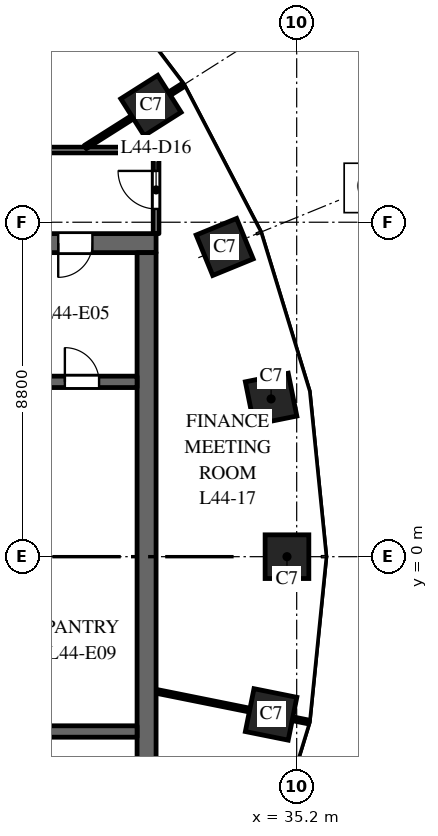
"""IFC4 building model, lengths in metres.
Left out: names, types, materials, properties, quantities, classifications, styles, units other than length and angle.
Written with IfcOpenShell. Run it as: python <this file> out.ifc"""

import sys

from ifc_helpers import new_model, si_unit, direction, frame, frame_2d, origin, origin_2d, place, context, subcontext, project, spatial, rectangle, extrude, element, fill, save


model = new_model("IFC4")
c1 = context("Model", 3, precision=1e-05, world=origin(), true_north=direction((0.0, 1.0)))
c2 = subcontext(c1, "Body", "Model", "MODEL_VIEW")
j1 = project(units=[si_unit("LENGTHUNIT", "METRE"), si_unit("PLANEANGLEUNIT", "RADIAN")], contexts=[c1])
p1 = place(None, origin())
s1 = spatial("IfcSite", under=j1, at=p1, CompositionType="ELEMENT")
p2 = place(p1, origin())
s2 = spatial("IfcBuilding", under=s1, at=p2, CompositionType="ELEMENT")
p3 = place(p2, frame((0.0, 0.0, 190.0)))
s3 = spatial("IfcBuildingStorey", under=s2, at=p3, CompositionType="ELEMENT", Elevation=190.0)
for number, where, z_axis, x_axis in (
    (1, (34.945, 0.0, 0.0), (0.0, 0.0, 1.0), (0.0, 1.0, 0.0)),
    (2, (34.527, 4.151, 0.0), (0.0, 0.0, 1.0), (-0.197, 0.98, 0.0)),
    (3, (33.305, 8.149, 0.0), (0.0, 0.0, 1.0), (-0.379, 0.925, 0.0)),
    (4, (31.365, 11.871, 0.0), (0.0, 0.0, 1.0), (-0.535, 0.845, 0.0)),
    (5, (34.527, -4.151, 0.0), (0.0, 0.0, 1.0), (0.197, 0.98, 0.0)),
):
    element("IfcColumn", number, at=place(p3, frame(where, z_axis=z_axis, x_axis=x_axis)), inside=s3, PredefinedType="COLUMN", context=c2, shape_type="SweptSolid", body=[
        extrude(rectangle(XDim=1.15, YDim=1.15, at=origin_2d()), origin(), (0.0, 0.0, 1.0), 4.0),
    ])
p4 = place(p3, frame((16.5, 8.25, 0.0), z_axis=(0.0, 0.0, 1.0), x_axis=(1.0, 0.0, 0.0)))
e6 = element("IfcWall", 6, at=p4, inside=s3, PredefinedType="SHEAR", context=c2, shape_type="SweptSolid", body=[
    extrude(rectangle(XDim=15.0, YDim=0.5, at=frame_2d((7.5, 0.0))), origin(), (0.0, 0.0, 1.0), 3.7),
])
p5 = place(p4, frame((6.9, 0.0, 0.0)))
e7 = element("IfcOpeningElement", 7, at=p5, cuts=e6, PredefinedType="OPENING", context=c2, shape_type="SweptSolid", body=[
    extrude(rectangle(XDim=1.2, YDim=2.1, at=frame_2d((0.6, 1.05))), frame((0.0, 0.26, 0.0), z_axis=(0.0, -1.0, 0.0), x_axis=(1.0, 0.0, 0.0)), (0.0, 0.0, 1.0), 0.52),
])
p6 = place(p4, frame((12.425, 0.0, 0.0)))
e8 = element("IfcOpeningElement", 8, at=p6, cuts=e6, PredefinedType="OPENING", context=c2, shape_type="SweptSolid", body=[
    extrude(rectangle(XDim=0.9, YDim=2.1, at=frame_2d((0.45, 1.05))), frame((0.0, 0.26, 0.0), z_axis=(0.0, -1.0, 0.0), x_axis=(1.0, 0.0, 0.0)), (0.0, 0.0, 1.0), 0.52),
])
p7 = place(p3, frame((31.25, -8.0, 0.0), z_axis=(0.0, 0.0, 1.0), x_axis=(0.0, 1.0, 0.0)))
e9 = element("IfcWall", 9, at=p7, inside=s3, PredefinedType="SHEAR", context=c2, shape_type="SweptSolid", body=[
    extrude(rectangle(XDim=16.0, YDim=0.5, at=frame_2d((8.0, 0.0))), origin(), (0.0, 0.0, 1.0), 3.7),
])
p8 = place(p3, frame((24.9, 4.6, 0.0), z_axis=(0.0, 0.0, 1.0), x_axis=(1.0, 0.0, 0.0)))
e10 = element("IfcWall", 10, at=p8, inside=s3, PredefinedType="SHEAR", context=c2, shape_type="SweptSolid", body=[
    extrude(rectangle(XDim=6.1, YDim=0.3, at=frame_2d((3.05, 0.0))), origin(), (0.0, 0.0, 1.0), 3.7),
])
p9 = place(p8, frame((4.2, 0.0, 0.0)))
e11 = element("IfcOpeningElement", 11, at=p9, cuts=e10, PredefinedType="OPENING", context=c2, shape_type="SweptSolid", body=[
    extrude(rectangle(XDim=0.9, YDim=2.1, at=frame_2d((0.45, 1.05))), frame((0.0, 0.16, 0.0), z_axis=(0.0, -1.0, 0.0), x_axis=(1.0, 0.0, 0.0)), (0.0, 0.0, 1.0), 0.32),
])
p10 = place(p3, frame((24.9, -4.6, 0.0), z_axis=(0.0, 0.0, 1.0), x_axis=(1.0, 0.0, 0.0)))
e12 = element("IfcWall", 12, at=p10, inside=s3, PredefinedType="SHEAR", context=c2, shape_type="SweptSolid", body=[
    extrude(rectangle(XDim=6.1, YDim=0.3, at=frame_2d((3.05, 0.0))), origin(), (0.0, 0.0, 1.0), 3.7),
])
p11 = place(p3, frame((23.623, 10.7, 0.0), z_axis=(0.0, 0.0, 1.0), x_axis=(1.0, 0.0, 0.0)))
e13 = element("IfcWall", 13, at=p11, inside=s3, PredefinedType="PARTITIONING", context=c2, shape_type="SweptSolid", body=[
    extrude(rectangle(XDim=7.877, YDim=0.15, at=frame_2d((3.938, 0.0))), origin(), (0.0, 0.0, 1.0), 2.9),
])
p12 = place(p11, frame((0.498, 0.0, 0.0)))
e14 = element("IfcOpeningElement", 14, at=p12, cuts=e13, PredefinedType="OPENING", context=c2, shape_type="SweptSolid", body=[
    extrude(rectangle(XDim=1.0, YDim=2.1, at=frame_2d((0.5, 1.05))), frame((0.0, 0.085, 0.0), z_axis=(0.0, -1.0, 0.0), x_axis=(1.0, 0.0, 0.0)), (0.0, 0.0, 1.0), 0.17),
])
p13 = place(p3, frame((29.637, 10.777, 0.0), z_axis=(0.0, 0.0, 1.0), x_axis=(0.844810627195, 0.535065420467, 0.0)))
e15 = element("IfcWall", 15, at=p13, inside=s3, PredefinedType="PARTITIONING", context=c2, shape_type="SweptSolid", body=[
    extrude(rectangle(XDim=3.048, YDim=0.1, at=frame_2d((1.524, 0.0))), origin(), (0.0, 0.0, 1.0), 2.9),
])
p14 = place(p3, frame((31.5, -3.542, 0.0), z_axis=(0.0, 0.0, 1.0), x_axis=(0.980357474535, -0.197228857227, 0.0)))
e16 = element("IfcWall", 16, at=p14, inside=s3, PredefinedType="PARTITIONING", context=c2, shape_type="SweptSolid", body=[
    extrude(rectangle(XDim=4.092, YDim=0.1, at=frame_2d((2.046, 0.0))), origin(), (0.0, 0.0, 1.0), 2.9),
])
p15 = place(p3, frame((31.5, 8.5, 0.0), z_axis=(0.0, 0.0, 1.0), x_axis=(0.0, 1.0, 0.0)))
e17 = element("IfcWall", 17, at=p15, inside=s3, PredefinedType="PARTITIONING", context=c2, shape_type="SweptSolid", body=[
    extrude(rectangle(XDim=2.2, YDim=0.15, at=frame_2d((1.1, 0.0))), origin(), (0.0, 0.0, 1.0), 2.9),
])
p16 = place(p15, frame((0.65, 0.0, 0.0)))
e18 = element("IfcOpeningElement", 18, at=p16, cuts=e17, PredefinedType="OPENING", context=c2, shape_type="SweptSolid", body=[
    extrude(rectangle(XDim=1.0, YDim=2.1, at=frame_2d((0.5, 1.05))), frame((0.0, 0.085, 0.0), z_axis=(0.0, -1.0, 0.0), x_axis=(1.0, 0.0, 0.0)), (0.0, 0.0, 1.0), 0.17),
])
p17 = place(p6, origin())
e19 = element("IfcDoor", 19, at=p17, inside=s3, OperationType="SINGLE_SWING_LEFT", PredefinedType="DOOR", context=c2, shape_type="SweptSolid", body=[
    extrude(rectangle(XDim=0.9, YDim=2.1, at=frame_2d((0.45, 1.05))), frame((0.0, 0.025, 0.0), z_axis=(0.0, -1.0, 0.0), x_axis=(1.0, 0.0, 0.0)), (0.0, 0.0, 1.0), 0.05),
])
fill(e8, e19)
p18 = place(p9, origin())
e20 = element("IfcDoor", 20, at=p18, inside=s3, OperationType="SINGLE_SWING_RIGHT", PredefinedType="DOOR", context=c2, shape_type="SweptSolid", body=[
    extrude(rectangle(XDim=0.9, YDim=2.1, at=frame_2d((0.45, 1.05))), frame((0.0, 0.025, 0.0), z_axis=(0.0, -1.0, 0.0), x_axis=(1.0, 0.0, 0.0)), (0.0, 0.0, 1.0), 0.05),
])
fill(e11, e20)
p19 = place(p16, origin())
e21 = element("IfcDoor", 21, at=p19, inside=s3, OperationType="SINGLE_SWING_RIGHT", PredefinedType="DOOR", context=c2, shape_type="SweptSolid", body=[
    extrude(rectangle(XDim=1.0, YDim=2.1, at=frame_2d((0.5, 1.05))), frame((0.0, 0.025, 0.0), z_axis=(0.0, -1.0, 0.0), x_axis=(1.0, 0.0, 0.0)), (0.0, 0.0, 1.0), 0.05),
])
fill(e18, e21)
save(model, sys.argv[1])
